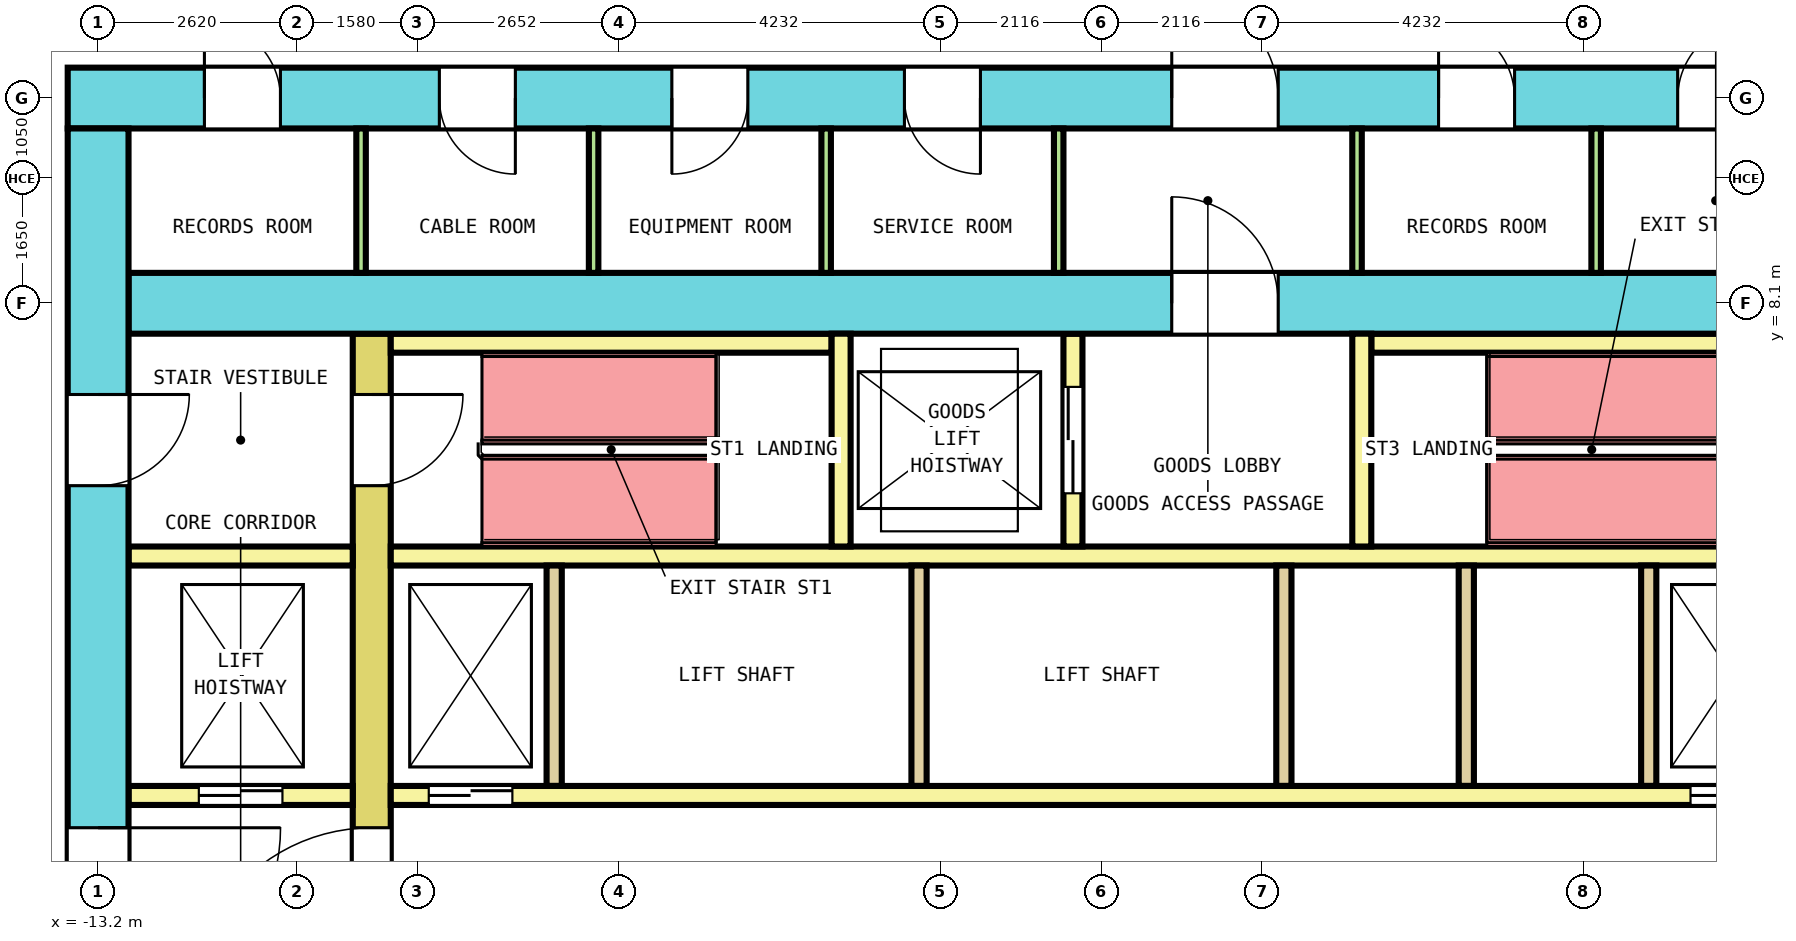
"""IFC4 building model, lengths in metres.
Left out: names, types, materials, properties, quantities, classifications, styles, units other than length and angle.
Written with IfcOpenShell. Run it as: python <this file> out.ifc"""

import sys

from ifc_helpers import new_model, si_unit, direction, frame, frame_2d, origin, place, context, subcontext, project, spatial, rectangle, extrude, element, fill, save


model = new_model("IFC4")
c1 = context("Model", 3, precision=1e-05, world=origin(), true_north=direction((0.0, 1.0)))
c2 = subcontext(c1, "Body", "Model", "MODEL_VIEW")
j1 = project(units=[si_unit("LENGTHUNIT", "METRE"), si_unit("PLANEANGLEUNIT", "RADIAN")], contexts=[c1])
p1 = place(None, origin())
s1 = spatial("IfcSite", under=j1, at=p1, CompositionType="ELEMENT")
p2 = place(p1, origin())
s2 = spatial("IfcBuilding", under=s1, at=p2, CompositionType="ELEMENT")
p3 = place(p2, frame((0.0, 0.0, 98.4)))
s3 = spatial("IfcBuildingStorey", under=s2, at=p3, CompositionType="ELEMENT", Elevation=98.4)
p4 = place(p3, frame((-13.6, 10.8, 0.0), z_axis=(0.0, 0.0, 1.0), x_axis=(1.0, 0.0, 0.0)))
e1 = element("IfcWall", 1, at=p4, inside=s3, PredefinedType="SHEAR", context=c2, shape_type="SweptSolid", body=[
    extrude(rectangle(XDim=27.2, YDim=0.8, at=frame_2d((13.6, 0.0))), origin(), (0.0, 0.0, 1.0), 4.1),
])
p5 = place(p4, frame((1.798, 0.0, 0.0)))
e2 = element("IfcOpeningElement", 2, at=p5, cuts=e1, PredefinedType="OPENING", context=c2, shape_type="SweptSolid", body=[
    extrude(rectangle(XDim=1.0, YDim=2.1, at=frame_2d((0.5, 1.05))), frame((0.0, 0.41, 0.0), z_axis=(0.0, -1.0, 0.0), x_axis=(1.0, 0.0, 0.0)), (0.0, 0.0, 1.0), 0.82),
])
p6 = place(p4, frame((4.889, 0.0, 0.0)))
e3 = element("IfcOpeningElement", 3, at=p6, cuts=e1, PredefinedType="OPENING", context=c2, shape_type="SweptSolid", body=[
    extrude(rectangle(XDim=1.0, YDim=2.1, at=frame_2d((0.5, 1.05))), frame((0.0, 0.41, 0.0), z_axis=(0.0, -1.0, 0.0), x_axis=(1.0, 0.0, 0.0)), (0.0, 0.0, 1.0), 0.82),
])
p7 = place(p4, frame((7.948, 0.0, 0.0)))
e4 = element("IfcOpeningElement", 4, at=p7, cuts=e1, PredefinedType="OPENING", context=c2, shape_type="SweptSolid", body=[
    extrude(rectangle(XDim=1.0, YDim=2.1, at=frame_2d((0.5, 1.05))), frame((0.0, 0.41, 0.0), z_axis=(0.0, -1.0, 0.0), x_axis=(1.0, 0.0, 0.0)), (0.0, 0.0, 1.0), 0.82),
])
p8 = place(p4, frame((11.008, 0.0, 0.0)))
e5 = element("IfcOpeningElement", 5, at=p8, cuts=e1, PredefinedType="OPENING", context=c2, shape_type="SweptSolid", body=[
    extrude(rectangle(XDim=1.0, YDim=2.1, at=frame_2d((0.5, 1.05))), frame((0.0, 0.41, 0.0), z_axis=(0.0, -1.0, 0.0), x_axis=(1.0, 0.0, 0.0)), (0.0, 0.0, 1.0), 0.82),
])
p9 = place(p4, frame((18.035, 0.0, 0.0)))
e6 = element("IfcOpeningElement", 6, at=p9, cuts=e1, PredefinedType="OPENING", context=c2, shape_type="SweptSolid", body=[
    extrude(rectangle(XDim=1.0, YDim=2.1, at=frame_2d((0.5, 1.05))), frame((0.0, 0.41, 0.0), z_axis=(0.0, -1.0, 0.0), x_axis=(1.0, 0.0, 0.0)), (0.0, 0.0, 1.0), 0.82),
])
p10 = place(p4, frame((21.181, 0.0, 0.0)))
e7 = element("IfcOpeningElement", 7, at=p10, cuts=e1, PredefinedType="OPENING", context=c2, shape_type="SweptSolid", body=[
    extrude(rectangle(XDim=1.0, YDim=2.1, at=frame_2d((0.5, 1.05))), frame((0.0, 0.41, 0.0), z_axis=(0.0, -1.0, 0.0), x_axis=(1.0, 0.0, 0.0)), (0.0, 0.0, 1.0), 0.82),
])
p11 = place(p4, frame((24.358, 0.0, 0.0)))
e8 = element("IfcOpeningElement", 8, at=p11, cuts=e1, PredefinedType="OPENING", context=c2, shape_type="SweptSolid", body=[
    extrude(rectangle(XDim=1.0, YDim=2.1, at=frame_2d((0.5, 1.05))), frame((0.0, 0.41, 0.0), z_axis=(0.0, -1.0, 0.0), x_axis=(1.0, 0.0, 0.0)), (0.0, 0.0, 1.0), 0.82),
])
p12 = place(p4, frame((14.525, 0.0, 0.0)))
e9 = element("IfcOpeningElement", 9, at=p12, cuts=e1, PredefinedType="OPENING", context=c2, shape_type="SweptSolid", body=[
    extrude(rectangle(XDim=1.4, YDim=2.1, at=frame_2d((0.7, 1.05))), frame((0.0, 0.41, 0.0), z_axis=(0.0, -1.0, 0.0), x_axis=(1.0, 0.0, 0.0)), (0.0, 0.0, 1.0), 0.82),
])
p13 = place(p3, frame((-13.2, -10.4, 0.0), z_axis=(0.0, 0.0, 1.0), x_axis=(0.0, 1.0, 0.0)))
e10 = element("IfcWall", 10, at=p13, inside=s3, PredefinedType="SHEAR", context=c2, shape_type="SweptSolid", body=[
    extrude(rectangle(XDim=20.8, YDim=0.8, at=frame_2d((10.4, 0.0))), origin(), (0.0, 0.0, 1.0), 4.1),
])
p14 = place(p13, frame((9.2, 0.0, 0.0)))
e11 = element("IfcOpeningElement", 11, at=p14, cuts=e10, PredefinedType="OPENING", context=c2, shape_type="SweptSolid", body=[
    extrude(rectangle(XDim=2.4, YDim=2.1, at=frame_2d((1.2, 1.05))), frame((0.0, 0.41, 0.0), z_axis=(0.0, -1.0, 0.0), x_axis=(1.0, 0.0, 0.0)), (0.0, 0.0, 1.0), 0.82),
])
p15 = place(p13, frame((16.1, 0.0, 0.0)))
e12 = element("IfcOpeningElement", 12, at=p15, cuts=e10, PredefinedType="OPENING", context=c2, shape_type="SweptSolid", body=[
    extrude(rectangle(XDim=1.2, YDim=2.1, at=frame_2d((0.6, 1.05))), frame((0.0, 0.41, 0.0), z_axis=(0.0, -1.0, 0.0), x_axis=(1.0, 0.0, 0.0)), (0.0, 0.0, 1.0), 0.82),
])
p16 = place(p13, frame((3.5, 0.0, 0.0)))
e13 = element("IfcOpeningElement", 13, at=p16, cuts=e10, PredefinedType="OPENING", context=c2, shape_type="SweptSolid", body=[
    extrude(rectangle(XDim=1.2, YDim=2.1, at=frame_2d((0.6, 1.05))), frame((0.0, 0.41, 0.0), z_axis=(0.0, -1.0, 0.0), x_axis=(1.0, 0.0, 0.0)), (0.0, 0.0, 1.0), 0.82),
])
p17 = place(p3, frame((-12.8, 8.1, 0.0), z_axis=(0.0, 0.0, 1.0), x_axis=(1.0, 0.0, 0.0)))
e14 = element("IfcWall", 14, at=p17, inside=s3, PredefinedType="SHEAR", context=c2, shape_type="SweptSolid", body=[
    extrude(rectangle(XDim=25.6, YDim=0.8, at=frame_2d((12.8, 0.0))), origin(), (0.0, 0.0, 1.0), 4.1),
])
p18 = place(p17, frame((13.725, 0.0, 0.0)))
e15 = element("IfcOpeningElement", 15, at=p18, cuts=e14, PredefinedType="OPENING", context=c2, shape_type="SweptSolid", body=[
    extrude(rectangle(XDim=1.4, YDim=2.1, at=frame_2d((0.7, 1.05))), frame((0.0, 0.41, 0.0), z_axis=(0.0, -1.0, 0.0), x_axis=(1.0, 0.0, 0.0)), (0.0, 0.0, 1.0), 0.82),
])
p19 = place(p3, frame((-9.6, -7.7, 0.0), z_axis=(0.0, 0.0, 1.0), x_axis=(0.0, 1.0, 0.0)))
e16 = element("IfcWall", 16, at=p19, inside=s3, PredefinedType="SHEAR", context=c2, shape_type="SweptSolid", body=[
    extrude(rectangle(XDim=15.4, YDim=0.5, at=frame_2d((7.7, 0.0))), origin(), (0.0, 0.0, 1.0), 4.1),
])
p20 = place(p19, frame((6.5, 0.0, 0.0)))
e17 = element("IfcOpeningElement", 17, at=p20, cuts=e16, PredefinedType="OPENING", context=c2, shape_type="SweptSolid", body=[
    extrude(rectangle(XDim=2.4, YDim=2.1, at=frame_2d((1.2, 1.05))), frame((0.0, 0.26, 0.0), z_axis=(0.0, -1.0, 0.0), x_axis=(1.0, 0.0, 0.0)), (0.0, 0.0, 1.0), 0.52),
])
p21 = place(p19, frame((13.4, 0.0, 0.0)))
e18 = element("IfcOpeningElement", 18, at=p21, cuts=e16, PredefinedType="OPENING", context=c2, shape_type="SweptSolid", body=[
    extrude(rectangle(XDim=1.2, YDim=2.1, at=frame_2d((0.6, 1.05))), frame((0.0, 0.26, 0.0), z_axis=(0.0, -1.0, 0.0), x_axis=(1.0, 0.0, 0.0)), (0.0, 0.0, 1.0), 0.52),
])
p22 = place(p19, frame((0.8, 0.0, 0.0)))
e19 = element("IfcOpeningElement", 19, at=p22, cuts=e16, PredefinedType="OPENING", context=c2, shape_type="SweptSolid", body=[
    extrude(rectangle(XDim=1.2, YDim=2.1, at=frame_2d((0.6, 1.05))), frame((0.0, 0.26, 0.0), z_axis=(0.0, -1.0, 0.0), x_axis=(1.0, 0.0, 0.0)), (0.0, 0.0, 1.0), 0.52),
])
p23 = place(p3, frame((-12.8, 1.625, 0.0), z_axis=(0.0, 0.0, 1.0), x_axis=(1.0, 0.0, 0.0)))
e20 = element("IfcWall", 20, at=p23, inside=s3, PredefinedType="SOLIDWALL", context=c2, shape_type="SweptSolid", body=[
    extrude(rectangle(XDim=2.95, YDim=0.25, at=frame_2d((1.475, 0.0))), origin(), (0.0, 0.0, 1.0), 4.1),
])
p24 = place(p23, frame((0.925, 0.0, 0.0)))
e21 = element("IfcOpeningElement", 21, at=p24, cuts=e20, PredefinedType="OPENING", context=c2, shape_type="SweptSolid", body=[
    extrude(rectangle(XDim=1.1, YDim=2.1, at=frame_2d((0.55, 1.05))), frame((0.0, 0.135, 0.0), z_axis=(0.0, -1.0, 0.0), x_axis=(1.0, 0.0, 0.0)), (0.0, 0.0, 1.0), 0.27),
])
p25 = place(p3, frame((-9.35, 1.625, 0.0), z_axis=(0.0, 0.0, 1.0), x_axis=(1.0, 0.0, 0.0)))
e22 = element("IfcWall", 22, at=p25, inside=s3, PredefinedType="SOLIDWALL", context=c2, shape_type="SweptSolid", body=[
    extrude(rectangle(XDim=18.7, YDim=0.25, at=frame_2d((9.35, 0.0))), origin(), (0.0, 0.0, 1.0), 4.1),
])
p26 = place(p25, frame((0.5, 0.0, 0.0)))
e23 = element("IfcOpeningElement", 23, at=p26, cuts=e22, PredefinedType="OPENING", context=c2, shape_type="SweptSolid", body=[
    extrude(rectangle(XDim=1.1, YDim=2.1, at=frame_2d((0.55, 1.05))), frame((0.0, 0.135, 0.0), z_axis=(0.0, -1.0, 0.0), x_axis=(1.0, 0.0, 0.0)), (0.0, 0.0, 1.0), 0.27),
])
p27 = place(p25, frame((17.1, 0.0, 0.0)))
e24 = element("IfcOpeningElement", 24, at=p27, cuts=e22, PredefinedType="OPENING", context=c2, shape_type="SweptSolid", body=[
    extrude(rectangle(XDim=1.1, YDim=2.1, at=frame_2d((0.55, 1.05))), frame((0.0, 0.135, 0.0), z_axis=(0.0, -1.0, 0.0), x_axis=(1.0, 0.0, 0.0)), (0.0, 0.0, 1.0), 0.27),
])
p28 = place(p3, frame((-12.8, 4.775, 0.0), z_axis=(0.0, 0.0, 1.0), x_axis=(1.0, 0.0, 0.0)))
e25 = element("IfcWall", 25, at=p28, inside=s3, PredefinedType="SOLIDWALL", context=c2, shape_type="SweptSolid", body=[
    extrude(rectangle(XDim=2.95, YDim=0.25, at=frame_2d((1.475, 0.0))), origin(), (0.0, 0.0, 1.0), 4.1),
])
p29 = place(p3, frame((-9.35, 4.775, 0.0), z_axis=(0.0, 0.0, 1.0), x_axis=(1.0, 0.0, 0.0)))
e26 = element("IfcWall", 26, at=p29, inside=s3, PredefinedType="SOLIDWALL", context=c2, shape_type="SweptSolid", body=[
    extrude(rectangle(XDim=18.7, YDim=0.25, at=frame_2d((9.35, 0.0))), origin(), (0.0, 0.0, 1.0), 4.1),
])
for number, where, z_axis, x_axis in (
    (27, (-7.2, 1.75, 0.0), (0.0, 0.0, 1.0), (0.0, 1.0, 0.0)),
    (28, (-2.4, 1.75, 0.0), (0.0, 0.0, 1.0), (0.0, 1.0, 0.0)),
    (29, (2.4, 1.75, 0.0), (0.0, 0.0, 1.0), (0.0, 1.0, 0.0)),
    (30, (4.8, 1.75, 0.0), (0.0, 0.0, 1.0), (0.0, 1.0, 0.0)),
    (31, (7.2, 1.75, 0.0), (0.0, 0.0, 1.0), (0.0, 1.0, 0.0)),
):
    element("IfcWall", number, at=place(p3, frame(where, z_axis=z_axis, x_axis=x_axis)), inside=s3, PredefinedType="SOLIDWALL", context=c2, shape_type="SweptSolid", body=[
        extrude(rectangle(XDim=2.9, YDim=0.2, at=frame_2d((1.45, 0.0))), origin(), (0.0, 0.0, 1.0), 4.1),
    ])
for number, where, z_axis, x_axis in (
    (32, (-9.35, 7.575, 0.0), (0.0, 0.0, 1.0), (1.0, 0.0, 0.0)),
    (33, (3.55, 7.575, 0.0), (0.0, 0.0, 1.0), (1.0, 0.0, 0.0)),
):
    element("IfcWall", number, at=place(p3, frame(where, z_axis=z_axis, x_axis=x_axis)), inside=s3, PredefinedType="SOLIDWALL", context=c2, shape_type="SweptSolid", body=[
        extrude(rectangle(XDim=5.8, YDim=0.25, at=frame_2d((2.9, 0.0))), origin(), (0.0, 0.0, 1.0), 4.1),
    ])
p30 = place(p3, frame((-3.425, 4.9, 0.0), z_axis=(0.0, 0.0, 1.0), x_axis=(0.0, 1.0, 0.0)))
e34 = element("IfcWall", 34, at=p30, inside=s3, PredefinedType="SOLIDWALL", context=c2, shape_type="SweptSolid", body=[
    extrude(rectangle(XDim=2.8, YDim=0.25, at=frame_2d((1.4, 0.0))), origin(), (0.0, 0.0, 1.0), 4.1),
])
p31 = place(p3, frame((-0.375, 4.9, 0.0), z_axis=(0.0, 0.0, 1.0), x_axis=(0.0, 1.0, 0.0)))
e35 = element("IfcWall", 35, at=p31, inside=s3, PredefinedType="SOLIDWALL", context=c2, shape_type="SweptSolid", body=[
    extrude(rectangle(XDim=2.8, YDim=0.25, at=frame_2d((1.4, 0.0))), origin(), (0.0, 0.0, 1.0), 4.1),
])
p32 = place(p31, frame((0.7, 0.0, 0.0)))
e36 = element("IfcOpeningElement", 36, at=p32, cuts=e35, PredefinedType="OPENING", context=c2, shape_type="SweptSolid", body=[
    extrude(rectangle(XDim=1.4, YDim=2.1, at=frame_2d((0.7, 1.05))), frame((0.0, 0.135, 0.0), z_axis=(0.0, -1.0, 0.0), x_axis=(1.0, 0.0, 0.0)), (0.0, 0.0, 1.0), 0.27),
])
p33 = place(p3, frame((3.425, 4.9, 0.0), z_axis=(0.0, 0.0, 1.0), x_axis=(0.0, 1.0, 0.0)))
e37 = element("IfcWall", 37, at=p33, inside=s3, PredefinedType="SOLIDWALL", context=c2, shape_type="SweptSolid", body=[
    extrude(rectangle(XDim=2.8, YDim=0.25, at=frame_2d((1.4, 0.0))), origin(), (0.0, 0.0, 1.0), 4.1),
])
for number, where, z_axis, x_axis in (
    (38, (-9.74, 8.5, 0.0), (0.0, 0.0, 1.0), (0.0, 1.0, 0.0)),
    (39, (-6.681, 8.5, 0.0), (0.0, 0.0, 1.0), (0.0, 1.0, 0.0)),
    (40, (-3.622, 8.5, 0.0), (0.0, 0.0, 1.0), (0.0, 1.0, 0.0)),
    (41, (-0.562, 8.5, 0.0), (0.0, 0.0, 1.0), (0.0, 1.0, 0.0)),
    (42, (3.363, 8.5, 0.0), (0.0, 0.0, 1.0), (0.0, 1.0, 0.0)),
    (43, (6.508, 8.5, 0.0), (0.0, 0.0, 1.0), (0.0, 1.0, 0.0)),
):
    element("IfcWall", number, at=place(p3, frame(where, z_axis=z_axis, x_axis=x_axis)), inside=s3, PredefinedType="PARTITIONING", context=c2, shape_type="SweptSolid", body=[
        extrude(rectangle(XDim=1.9, YDim=0.125, at=frame_2d((0.95, 0.0))), origin(), (0.0, 0.0, 1.0), 4.1),
    ])
p34 = place(p24, origin())
e44 = element("IfcDoor", 44, at=p34, inside=s3, OperationType="DOUBLE_DOOR_SLIDING", PredefinedType="DOOR", context=c2, shape_type="SweptSolid", body=[
    extrude(rectangle(XDim=1.1, YDim=2.1, at=frame_2d((0.55, 1.05))), frame((0.0, 0.075, 0.0), z_axis=(0.0, -1.0, 0.0), x_axis=(1.0, 0.0, 0.0)), (0.0, 0.0, 1.0), 0.15),
])
fill(e21, e44)
p35 = place(p26, origin())
e45 = element("IfcDoor", 45, at=p35, inside=s3, OperationType="DOUBLE_DOOR_SLIDING", PredefinedType="DOOR", context=c2, shape_type="SweptSolid", body=[
    extrude(rectangle(XDim=1.1, YDim=2.1, at=frame_2d((0.55, 1.05))), frame((0.0, 0.075, 0.0), z_axis=(0.0, -1.0, 0.0), x_axis=(1.0, 0.0, 0.0)), (0.0, 0.0, 1.0), 0.15),
])
fill(e23, e45)
p36 = place(p27, origin())
e46 = element("IfcDoor", 46, at=p36, inside=s3, OperationType="DOUBLE_DOOR_SLIDING", PredefinedType="DOOR", context=c2, shape_type="SweptSolid", body=[
    extrude(rectangle(XDim=1.1, YDim=2.1, at=frame_2d((0.55, 1.05))), frame((0.0, 0.075, 0.0), z_axis=(0.0, -1.0, 0.0), x_axis=(1.0, 0.0, 0.0)), (0.0, 0.0, 1.0), 0.15),
])
fill(e24, e46)
p37 = place(p32, origin())
e47 = element("IfcDoor", 47, at=p37, inside=s3, OperationType="DOUBLE_DOOR_SLIDING", PredefinedType="DOOR", context=c2, shape_type="SweptSolid", body=[
    extrude(rectangle(XDim=1.4, YDim=2.1, at=frame_2d((0.7, 1.05))), frame((0.0, 0.075, 0.0), z_axis=(0.0, -1.0, 0.0), x_axis=(1.0, 0.0, 0.0)), (0.0, 0.0, 1.0), 0.15),
])
fill(e36, e47)
p38 = place(p20, origin())
e48 = element("IfcDoor", 48, at=p38, inside=s3, OperationType="DOUBLE_DOOR_SINGLE_SWING", PredefinedType="DOOR", context=c2, shape_type="SweptSolid", body=[
    extrude(rectangle(XDim=2.4, YDim=2.1, at=frame_2d((1.2, 1.05))), frame((0.0, 0.2, 0.0), z_axis=(0.0, -1.0, 0.0), x_axis=(1.0, 0.0, 0.0)), (0.0, 0.0, 1.0), 0.4),
])
fill(e17, e48)
p39 = place(p14, origin())
e49 = element("IfcDoor", 49, at=p39, inside=s3, OperationType="DOUBLE_DOOR_SINGLE_SWING", PredefinedType="DOOR", context=c2, shape_type="SweptSolid", body=[
    extrude(rectangle(XDim=2.4, YDim=2.1, at=frame_2d((1.2, 1.05))), frame((0.0, 0.3, 0.0), z_axis=(0.0, -1.0, 0.0), x_axis=(1.0, 0.0, 0.0)), (0.0, 0.0, 1.0), 0.6),
])
fill(e11, e49)
p40 = place(p21, origin())
e50 = element("IfcDoor", 50, at=p40, inside=s3, OperationType="SINGLE_SWING_RIGHT", PredefinedType="DOOR", context=c2, shape_type="SweptSolid", body=[
    extrude(rectangle(XDim=1.2, YDim=2.1, at=frame_2d((0.6, 1.05))), frame((0.0, 0.2, 0.0), z_axis=(0.0, -1.0, 0.0), x_axis=(1.0, 0.0, 0.0)), (0.0, 0.0, 1.0), 0.4),
])
fill(e18, e50)
p41 = place(p15, origin())
e51 = element("IfcDoor", 51, at=p41, inside=s3, OperationType="SINGLE_SWING_LEFT", PredefinedType="DOOR", context=c2, shape_type="SweptSolid", body=[
    extrude(rectangle(XDim=1.2, YDim=2.1, at=frame_2d((0.6, 1.05))), frame((0.0, 0.3, 0.0), z_axis=(0.0, -1.0, 0.0), x_axis=(1.0, 0.0, 0.0)), (0.0, 0.0, 1.0), 0.6),
])
fill(e12, e51)
p42 = place(p18, origin())
e52 = element("IfcDoor", 52, at=p42, inside=s3, OperationType="DOUBLE_DOOR_SINGLE_SWING", PredefinedType="DOOR", context=c2, shape_type="SweptSolid", body=[
    extrude(rectangle(XDim=1.4, YDim=2.1, at=frame_2d((0.7, 1.05))), frame((0.0, 0.3, 0.0), z_axis=(0.0, -1.0, 0.0), x_axis=(1.0, 0.0, 0.0)), (0.0, 0.0, 1.0), 0.6),
])
fill(e15, e52)
p43 = place(p5, origin())
e53 = element("IfcDoor", 53, at=p43, inside=s3, OperationType="SINGLE_SWING_RIGHT", PredefinedType="DOOR", context=c2, shape_type="SweptSolid", body=[
    extrude(rectangle(XDim=1.0, YDim=2.1, at=frame_2d((0.5, 1.05))), frame((0.0, 0.3, 0.0), z_axis=(0.0, -1.0, 0.0), x_axis=(1.0, 0.0, 0.0)), (0.0, 0.0, 1.0), 0.6),
])
fill(e2, e53)
p44 = place(p6, origin())
e54 = element("IfcDoor", 54, at=p44, inside=s3, OperationType="SINGLE_SWING_LEFT", PredefinedType="DOOR", context=c2, shape_type="SweptSolid", body=[
    extrude(rectangle(XDim=1.0, YDim=2.1, at=frame_2d((0.5, 1.05))), frame((0.0, 0.3, 0.0), z_axis=(0.0, -1.0, 0.0), x_axis=(1.0, 0.0, 0.0)), (0.0, 0.0, 1.0), 0.6),
])
fill(e3, e54)
p45 = place(p7, origin())
e55 = element("IfcDoor", 55, at=p45, inside=s3, OperationType="SINGLE_SWING_RIGHT", PredefinedType="DOOR", context=c2, shape_type="SweptSolid", body=[
    extrude(rectangle(XDim=1.0, YDim=2.1, at=frame_2d((0.5, 1.05))), frame((0.0, 0.3, 0.0), z_axis=(0.0, -1.0, 0.0), x_axis=(1.0, 0.0, 0.0)), (0.0, 0.0, 1.0), 0.6),
])
fill(e4, e55)
p46 = place(p8, origin())
e56 = element("IfcDoor", 56, at=p46, inside=s3, OperationType="SINGLE_SWING_LEFT", PredefinedType="DOOR", context=c2, shape_type="SweptSolid", body=[
    extrude(rectangle(XDim=1.0, YDim=2.1, at=frame_2d((0.5, 1.05))), frame((0.0, 0.3, 0.0), z_axis=(0.0, -1.0, 0.0), x_axis=(1.0, 0.0, 0.0)), (0.0, 0.0, 1.0), 0.6),
])
fill(e5, e56)
p47 = place(p9, origin())
e57 = element("IfcDoor", 57, at=p47, inside=s3, OperationType="SINGLE_SWING_RIGHT", PredefinedType="DOOR", context=c2, shape_type="SweptSolid", body=[
    extrude(rectangle(XDim=1.0, YDim=2.1, at=frame_2d((0.5, 1.05))), frame((0.0, 0.3, 0.0), z_axis=(0.0, -1.0, 0.0), x_axis=(1.0, 0.0, 0.0)), (0.0, 0.0, 1.0), 0.6),
])
fill(e6, e57)
p48 = place(p10, origin())
e58 = element("IfcDoor", 58, at=p48, inside=s3, OperationType="SINGLE_SWING_LEFT", PredefinedType="DOOR", context=c2, shape_type="SweptSolid", body=[
    extrude(rectangle(XDim=1.0, YDim=2.1, at=frame_2d((0.5, 1.05))), frame((0.0, 0.3, 0.0), z_axis=(0.0, -1.0, 0.0), x_axis=(1.0, 0.0, 0.0)), (0.0, 0.0, 1.0), 0.6),
])
fill(e7, e58)
p49 = place(p12, origin())
e59 = element("IfcDoor", 59, at=p49, inside=s3, OperationType="DOUBLE_DOOR_SINGLE_SWING", PredefinedType="DOOR", context=c2, shape_type="SweptSolid", body=[
    extrude(rectangle(XDim=1.4, YDim=2.1, at=frame_2d((0.7, 1.05))), frame((0.0, 0.3, 0.0), z_axis=(0.0, -1.0, 0.0), x_axis=(1.0, 0.0, 0.0)), (0.0, 0.0, 1.0), 0.6),
])
fill(e9, e59)
save(model, sys.argv[1])
